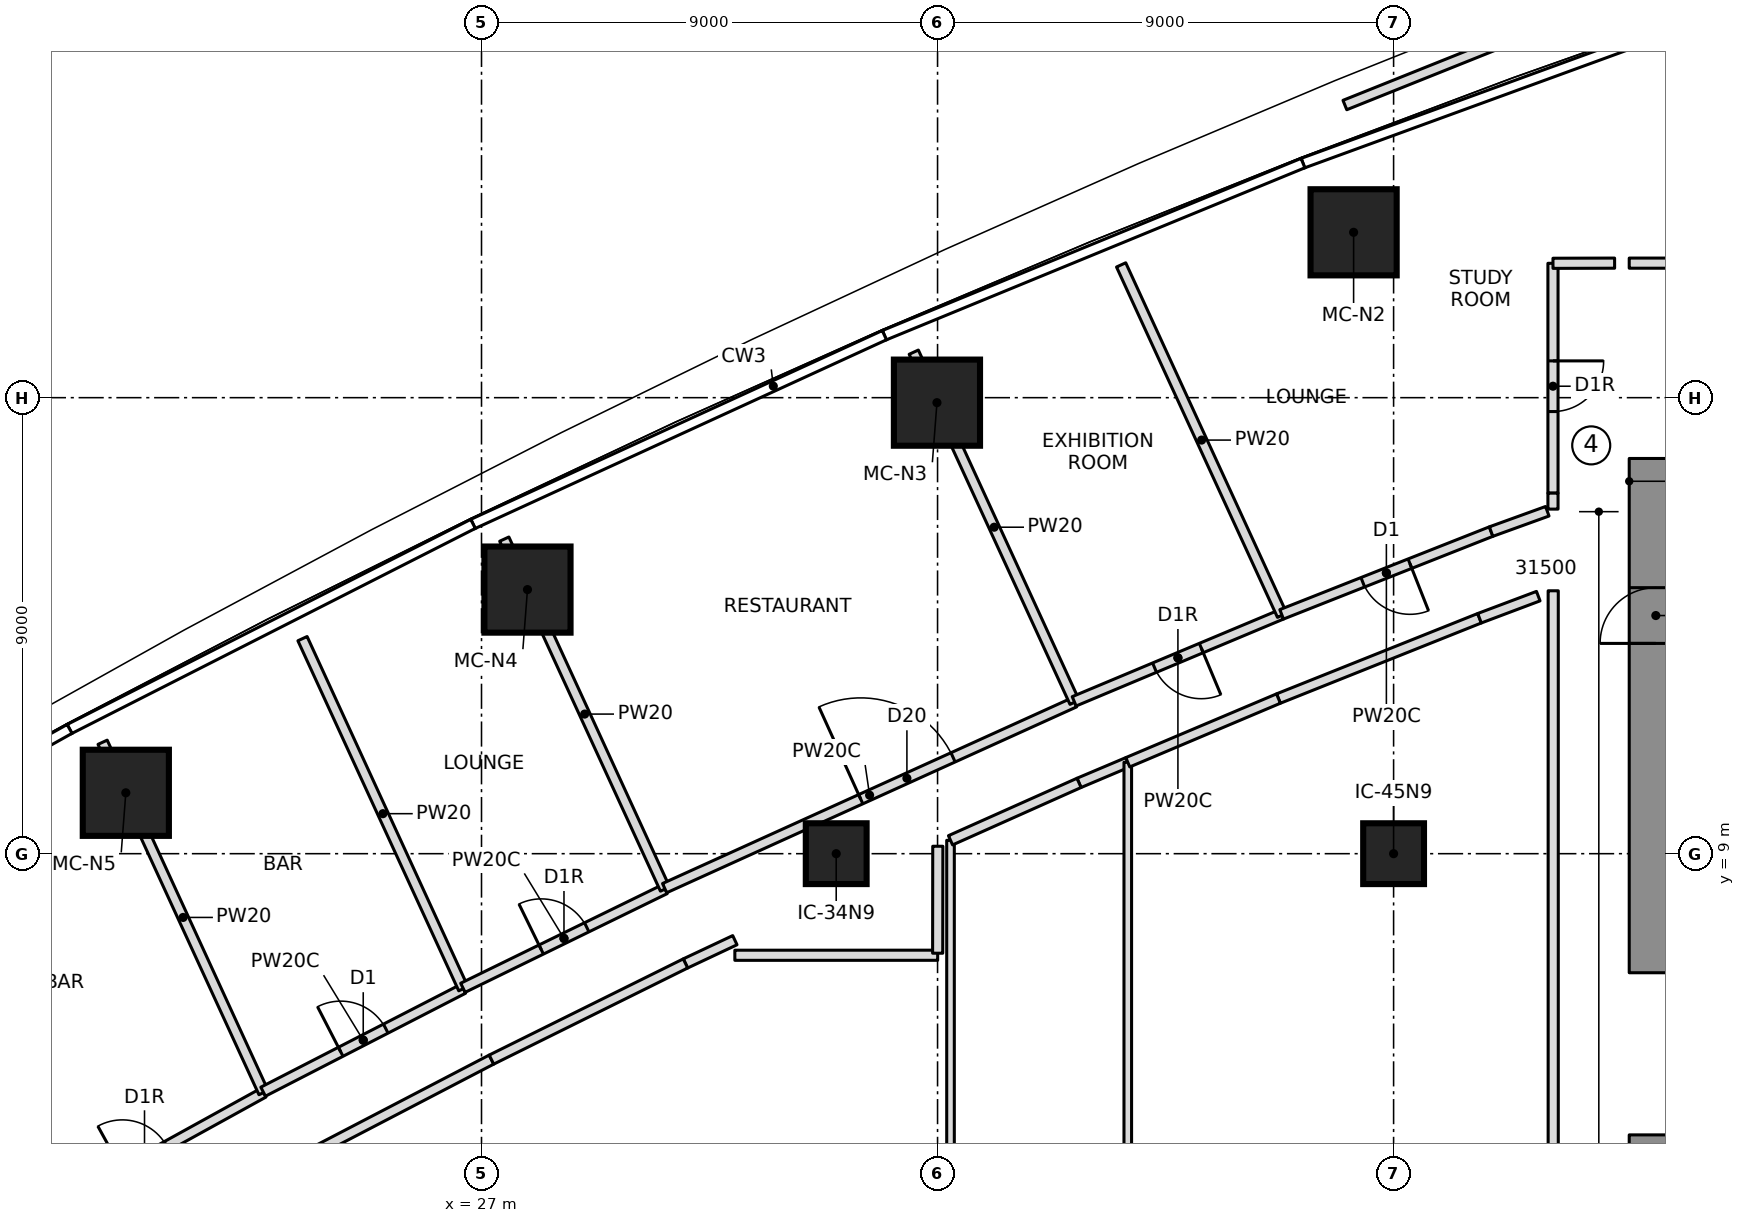
"""IFC4 building model, lengths in metres.
Left out: names, types, materials, properties, quantities, classifications, styles, units other than length and angle.
Written with IfcOpenShell. Run it as: python <this file> out.ifc"""

import sys

from ifc_helpers import new_model, si_unit, direction, frame, frame_2d, origin, origin_2d, place, context, subcontext, project, spatial, rectangle, extrude, element, fill, save


model = new_model("IFC4")
c1 = context("Model", 3, precision=1e-05, world=origin(), true_north=direction((0.0, 1.0)))
c2 = subcontext(c1, "Body", "Model", "MODEL_VIEW")
j1 = project(units=[si_unit("LENGTHUNIT", "METRE"), si_unit("PLANEANGLEUNIT", "RADIAN")], contexts=[c1])
p1 = place(None, origin())
s1 = spatial("IfcSite", under=j1, at=p1, CompositionType="ELEMENT")
p2 = place(p1, origin())
s2 = spatial("IfcBuilding", under=s1, at=p2, CompositionType="ELEMENT")
p3 = place(p2, frame((0.0, 0.0, 80.3)))
s3 = spatial("IfcBuildingStorey", under=s2, at=p3, CompositionType="ELEMENT", Elevation=80.3)
p4 = place(p3, frame((50.175, 6.65, 0.0), z_axis=(0.0, 0.0, 1.0), x_axis=(0.0, 1.0, 0.0)))
e1 = element("IfcWall", 1, at=p4, inside=s3, PredefinedType="SHEAR", context=c2, shape_type="SweptSolid", body=[
    extrude(rectangle(XDim=10.15, YDim=1.05, at=frame_2d((5.075, 0.0))), origin(), (0.0, 0.0, 1.0), 4.6),
])
p5 = place(p4, frame((6.5, 0.0, 0.0)))
e2 = element("IfcOpeningElement", 2, at=p5, cuts=e1, PredefinedType="OPENING", context=c2, shape_type="SweptSolid", body=[
    extrude(rectangle(XDim=1.1, YDim=2.1, at=frame_2d((0.55, 1.05))), frame((0.0, 0.535, 0.0), z_axis=(0.0, -1.0, 0.0), x_axis=(1.0, 0.0, 0.0)), (0.0, 0.0, 1.0), 1.07),
])
p6 = place(p3, frame((50.175, -3.45, 0.0), z_axis=(0.0, 0.0, 1.0), x_axis=(0.0, 1.0, 0.0)))
e3 = element("IfcWall", 3, at=p6, inside=s3, PredefinedType="SHEAR", context=c2, shape_type="SweptSolid", body=[
    extrude(rectangle(XDim=6.9, YDim=1.05, at=frame_2d((3.45, 0.0))), origin(), (0.0, 0.0, 1.0), 4.6),
])
for number, where, z_axis, x_axis in (
    (4, (44.211, 21.264, 0.0), (0.0, 0.0, 1.0), (1.0, 0.0, 0.0)),
    (5, (35.988, 17.902, 0.0), (0.0, 0.0, 1.0), (1.0, 0.0, 0.0)),
    (6, (27.907, 14.212, 0.0), (0.0, 0.0, 1.0), (1.0, 0.0, 0.0)),
    (7, (19.981, 10.202, 0.0), (0.0, 0.0, 1.0), (1.0, 0.0, 0.0)),
):
    element("IfcColumn", number, at=place(p3, frame(where, z_axis=z_axis, x_axis=x_axis)), inside=s3, PredefinedType="COLUMN", context=c2, shape_type="SweptSolid", body=[
        extrude(rectangle(XDim=1.7, YDim=1.7, at=origin_2d()), origin(), (0.0, 0.0, 1.0), 4.6),
    ])
for number, where, z_axis, x_axis in (
    (8, (34.0, 9.0, 0.0), (0.0, 0.0, 1.0), (1.0, 0.0, 0.0)),
    (9, (45.0, 9.0, 0.0), (0.0, 0.0, 1.0), (1.0, 0.0, 0.0)),
):
    element("IfcColumn", number, at=place(p3, frame(where, z_axis=z_axis, x_axis=x_axis)), inside=s3, PredefinedType="COLUMN", context=c2, shape_type="SweptSolid", body=[
        extrude(rectangle(XDim=1.2, YDim=1.2, at=origin_2d()), origin(), (0.0, 0.0, 1.0), 4.6),
    ])
p7 = place(p3, frame((47.924, 25.332, 0.0), z_axis=(0.0, 0.0, 1.0), x_axis=(-0.928295561605, -0.371843179719, 0.0)))
e10 = element("IfcWall", 10, at=p7, inside=s3, PredefinedType="PARAPET", context=c2, shape_type="SweptSolid", body=[
    extrude(rectangle(XDim=4.186, YDim=0.2, at=frame_2d((2.093, 0.0))), origin(), (0.0, 0.0, 1.0), 1.1),
])
p8 = place(p3, frame((18.0, 1.692, 0.0), z_axis=(0.0, 0.0, 1.0), x_axis=(0.875548487611, 0.483130257634, 0.0)))
e11 = element("IfcWall", 11, at=p8, inside=s3, PredefinedType="PARTITIONING", context=c2, shape_type="SweptSolid", body=[
    extrude(rectangle(XDim=5.367, YDim=0.2, at=frame_2d((2.683, 0.0))), origin(), (0.0, 0.0, 1.0), 4.3),
])
p9 = place(p8, frame((2.183, 0.0, 0.0)))
e12 = element("IfcOpeningElement", 12, at=p9, cuts=e11, PredefinedType="OPENING", context=c2, shape_type="SweptSolid", body=[
    extrude(rectangle(XDim=1.0, YDim=2.1, at=frame_2d((0.5, 1.05))), frame((0.0, 0.11, 0.0), z_axis=(0.0, -1.0, 0.0), x_axis=(1.0, 0.0, 0.0)), (0.0, 0.0, 1.0), 0.22),
])
p10 = place(p3, frame((22.699, 4.284, 0.0), z_axis=(0.0, 0.0, 1.0), x_axis=(-0.417413534969, 0.908716644959, 0.0)))
e13 = element("IfcWall", 13, at=p10, inside=s3, PredefinedType="PARTITIONING", context=c2, shape_type="SweptSolid", body=[
    extrude(rectangle(XDim=7.609, YDim=0.2, at=frame_2d((3.805, 0.0))), origin(), (0.0, 0.0, 1.0), 4.3),
])
p11 = place(p3, frame((22.69, 4.302, 0.0), z_axis=(0.0, 0.0, 1.0), x_axis=(0.889236075961, 0.457448577667, 0.0)))
e14 = element("IfcWall", 14, at=p11, inside=s3, PredefinedType="PARTITIONING", context=c2, shape_type="SweptSolid", body=[
    extrude(rectangle(XDim=4.443, YDim=0.2, at=frame_2d((2.222, 0.0))), origin(), (0.0, 0.0, 1.0), 4.3),
])
p12 = place(p11, frame((1.721, 0.0, 0.0)))
e15 = element("IfcOpeningElement", 15, at=p12, cuts=e14, PredefinedType="OPENING", context=c2, shape_type="SweptSolid", body=[
    extrude(rectangle(XDim=1.0, YDim=2.1, at=frame_2d((0.5, 1.05))), frame((0.0, 0.11, 0.0), z_axis=(0.0, -1.0, 0.0), x_axis=(1.0, 0.0, 0.0)), (0.0, 0.0, 1.0), 0.22),
])
p13 = place(p3, frame((26.641, 6.335, 0.0), z_axis=(0.0, 0.0, 1.0), x_axis=(-0.417455028008, 0.908697584233, 0.0)))
e16 = element("IfcWall", 16, at=p13, inside=s3, PredefinedType="PARTITIONING", context=c2, shape_type="SweptSolid", body=[
    extrude(rectangle(XDim=7.603, YDim=0.2, at=frame_2d((3.802, 0.0))), origin(), (0.0, 0.0, 1.0), 4.3),
])
p14 = place(p3, frame((26.633, 6.353, 0.0), z_axis=(0.0, 0.0, 1.0), x_axis=(0.898502457097, 0.438968489291, 0.0)))
e17 = element("IfcWall", 17, at=p14, inside=s3, PredefinedType="PARTITIONING", context=c2, shape_type="SweptSolid", body=[
    extrude(rectangle(XDim=4.44, YDim=0.2, at=frame_2d((2.22, 0.0))), origin(), (0.0, 0.0, 1.0), 4.3),
])
p15 = place(p14, frame((1.72, 0.0, 0.0)))
e18 = element("IfcOpeningElement", 18, at=p15, cuts=e17, PredefinedType="OPENING", context=c2, shape_type="SweptSolid", body=[
    extrude(rectangle(XDim=1.0, YDim=2.1, at=frame_2d((0.5, 1.05))), frame((0.0, 0.11, 0.0), z_axis=(0.0, -1.0, 0.0), x_axis=(1.0, 0.0, 0.0)), (0.0, 0.0, 1.0), 0.22),
])
p16 = place(p3, frame((30.622, 8.302, 0.0), z_axis=(0.0, 0.0, 1.0), x_axis=(-0.417429919618, 0.90870911859, 0.0)))
e19 = element("IfcWall", 19, at=p16, inside=s3, PredefinedType="PARTITIONING", context=c2, shape_type="SweptSolid", body=[
    extrude(rectangle(XDim=7.6, YDim=0.2, at=frame_2d((3.8, 0.0))), origin(), (0.0, 0.0, 1.0), 4.3),
])
p17 = place(p3, frame((30.614, 8.32, 0.0), z_axis=(0.0, 0.0, 1.0), x_axis=(0.910751030363, 0.41295588226, 0.0)))
e20 = element("IfcWall", 20, at=p17, inside=s3, PredefinedType="PARTITIONING", context=c2, shape_type="SweptSolid", body=[
    extrude(rectangle(XDim=8.883, YDim=0.2, at=frame_2d((4.442, 0.0))), origin(), (0.0, 0.0, 1.0), 4.3),
])
p18 = place(p17, frame((4.25, 0.0, 0.0)))
e21 = element("IfcOpeningElement", 21, at=p18, cuts=e20, PredefinedType="OPENING", context=c2, shape_type="SweptSolid", body=[
    extrude(rectangle(XDim=2.0, YDim=2.4, at=frame_2d((1.0, 1.2))), frame((0.0, 0.11, 0.0), z_axis=(0.0, -1.0, 0.0), x_axis=(1.0, 0.0, 0.0)), (0.0, 0.0, 1.0), 0.22),
])
p19 = place(p3, frame((38.704, 11.989, 0.0), z_axis=(0.0, 0.0, 1.0), x_axis=(-0.417416334044, 0.908715359215, 0.0)))
e22 = element("IfcWall", 22, at=p19, inside=s3, PredefinedType="PARTITIONING", context=c2, shape_type="SweptSolid", body=[
    extrude(rectangle(XDim=7.604, YDim=0.2, at=frame_2d((3.802, 0.0))), origin(), (0.0, 0.0, 1.0), 4.3),
])
p20 = place(p3, frame((42.791, 13.724, 0.0), z_axis=(0.0, 0.0, 1.0), x_axis=(-0.922230433067, -0.386640696675, 0.0)))
e23 = element("IfcWall", 23, at=p20, inside=s3, PredefinedType="PARTITIONING", context=c2, shape_type="SweptSolid", body=[
    extrude(rectangle(XDim=4.44, YDim=0.2, at=frame_2d((2.22, 0.0))), origin(), (0.0, 0.0, 1.0), 4.3),
])
p21 = place(p20, frame((1.72, 0.0, 0.0)))
e24 = element("IfcOpeningElement", 24, at=p21, cuts=e23, PredefinedType="OPENING", context=c2, shape_type="SweptSolid", body=[
    extrude(rectangle(XDim=1.0, YDim=2.1, at=frame_2d((0.5, 1.05))), frame((0.0, 0.11, 0.0), z_axis=(0.0, -1.0, 0.0), x_axis=(1.0, 0.0, 0.0)), (0.0, 0.0, 1.0), 0.22),
])
p22 = place(p3, frame((42.799, 13.705, 0.0), z_axis=(0.0, 0.0, 1.0), x_axis=(-0.417427858403, 0.908710065438, 0.0)))
e25 = element("IfcWall", 25, at=p22, inside=s3, PredefinedType="PARTITIONING", context=c2, shape_type="SweptSolid", body=[
    extrude(rectangle(XDim=7.61, YDim=0.2, at=frame_2d((3.805, 0.0))), origin(), (0.0, 0.0, 1.0), 4.3),
])
p23 = place(p3, frame((46.924, 15.357, 0.0), z_axis=(0.0, 0.0, 1.0), x_axis=(-0.930040633249, -0.367456692014, 0.0)))
e26 = element("IfcWall", 26, at=p23, inside=s3, PredefinedType="PARTITIONING", context=c2, shape_type="SweptSolid", body=[
    extrude(rectangle(XDim=4.444, YDim=0.2, at=frame_2d((2.222, 0.0))), origin(), (0.0, 0.0, 1.0), 4.3),
])
p24 = place(p23, frame((1.722, 0.0, 0.0)))
e27 = element("IfcOpeningElement", 27, at=p24, cuts=e26, PredefinedType="OPENING", context=c2, shape_type="SweptSolid", body=[
    extrude(rectangle(XDim=1.0, YDim=2.1, at=frame_2d((0.5, 1.05))), frame((0.0, 0.11, 0.0), z_axis=(0.0, -1.0, 0.0), x_axis=(1.0, 0.0, 0.0)), (0.0, 0.0, 1.0), 0.22),
])
p25 = place(p3, frame((31.025, 6.833, 0.0), z_axis=(0.0, 0.0, 1.0), x_axis=(0.904690325494, 0.426069730159, 0.0)))
e28 = element("IfcWall", 28, at=p25, inside=s3, PredefinedType="PARTITIONING", context=c2, shape_type="SweptSolid", body=[
    extrude(rectangle(XDim=1.078, YDim=0.2, at=frame_2d((0.539, 0.0))), origin(), (0.0, 0.0, 1.0), 4.3),
])
p26 = place(p3, frame((23.662, 3.095, 0.0), z_axis=(0.0, 0.0, 1.0), x_axis=(0.886903625221, 0.461954499459, 0.0)))
e29 = element("IfcWall", 29, at=p26, inside=s3, PredefinedType="PARTITIONING", context=c2, shape_type="SweptSolid", body=[
    extrude(rectangle(XDim=3.985, YDim=0.2, at=frame_2d((1.992, 0.0))), origin(), (0.0, 0.0, 1.0), 4.3),
])
p27 = place(p3, frame((27.196, 4.936, 0.0), z_axis=(0.0, 0.0, 1.0), x_axis=(0.895975836328, 0.44410280422, 0.0)))
e30 = element("IfcWall", 30, at=p27, inside=s3, PredefinedType="PARTITIONING", context=c2, shape_type="SweptSolid", body=[
    extrude(rectangle(XDim=4.273, YDim=0.2, at=frame_2d((2.137, 0.0))), origin(), (0.0, 0.0, 1.0), 4.3),
])
p28 = place(p3, frame((36.256, -9.264, 0.0), z_axis=(0.0, 0.0, 1.0), x_axis=(0.0, 1.0, 0.0)))
e31 = element("IfcWall", 31, at=p28, inside=s3, PredefinedType="PARTITIONING", context=c2, shape_type="SweptSolid", body=[
    extrude(rectangle(XDim=18.528, YDim=0.15, at=frame_2d((9.264, 0.0))), origin(), (0.0, 0.0, 1.0), 4.3),
])
p29 = place(p3, frame((38.792, 10.397, 0.0), z_axis=(0.0, 0.0, 1.0), x_axis=(0.921080112261, 0.389373120281, 0.0)))
e32 = element("IfcWall", 32, at=p29, inside=s3, PredefinedType="PARTITIONING", context=c2, shape_type="SweptSolid", body=[
    extrude(rectangle(XDim=1.045, YDim=0.2, at=frame_2d((0.522, 0.0))), origin(), (0.0, 0.0, 1.0), 4.3),
])
p30 = place(p3, frame((36.256, 9.264, 0.0), z_axis=(0.0, 0.0, 1.0), x_axis=(0.913023336604, 0.407907326259, 0.0)))
e33 = element("IfcWall", 33, at=p30, inside=s3, PredefinedType="PARTITIONING", context=c2, shape_type="SweptSolid", body=[
    extrude(rectangle(XDim=2.778, YDim=0.2, at=frame_2d((1.389, 0.0))), origin(), (0.0, 0.0, 1.0), 4.3),
])
p31 = place(p3, frame((39.754, -10.804, 0.0), z_axis=(0.0, 0.0, 1.0), x_axis=(0.0, 1.0, 0.0)))
e34 = element("IfcWall", 34, at=p31, inside=s3, PredefinedType="PARTITIONING", context=c2, shape_type="SweptSolid", body=[
    extrude(rectangle(XDim=21.608, YDim=0.15, at=frame_2d((10.804, 0.0))), origin(), (0.0, 0.0, 1.0), 4.3),
])
p32 = place(p3, frame((42.728, 12.062, 0.0), z_axis=(0.0, 0.0, 1.0), x_axis=(0.928638161177, 0.370986745864, 0.0)))
e35 = element("IfcWall", 35, at=p32, inside=s3, PredefinedType="PARTITIONING", context=c2, shape_type="SweptSolid", body=[
    extrude(rectangle(XDim=4.273, YDim=0.2, at=frame_2d((2.136, 0.0))), origin(), (0.0, 0.0, 1.0), 4.3),
])
p33 = place(p3, frame((39.754, 10.804, 0.0), z_axis=(0.0, 0.0, 1.0), x_axis=(0.921023598919, 0.389506778163, 0.0)))
e36 = element("IfcWall", 36, at=p33, inside=s3, PredefinedType="PARTITIONING", context=c2, shape_type="SweptSolid", body=[
    extrude(rectangle(XDim=3.229, YDim=0.2, at=frame_2d((1.614, 0.0))), origin(), (0.0, 0.0, 1.0), 4.3),
])
p34 = place(p3, frame((54.625, 20.655, 0.0), z_axis=(0.0, 0.0, 1.0), x_axis=(-1.0, 0.0, 0.0)))
e37 = element("IfcWall", 37, at=p34, inside=s3, PredefinedType="PARTITIONING", context=c2, shape_type="SweptSolid", body=[
    extrude(rectangle(XDim=4.976, YDim=0.2, at=frame_2d((2.488, 0.0))), origin(), (0.0, 0.0, 1.0), 4.3),
])
p35 = place(p34, frame((1.988, 0.0, 0.0)))
e38 = element("IfcOpeningElement", 38, at=p35, cuts=e37, PredefinedType="OPENING", context=c2, shape_type="SweptSolid", body=[
    extrude(rectangle(XDim=1.5, YDim=2.1, at=frame_2d((0.75, 1.05))), frame((0.0, 0.11, 0.0), z_axis=(0.0, -1.0, 0.0), x_axis=(1.0, 0.0, 0.0)), (0.0, 0.0, 1.0), 0.22),
])
p36 = place(p3, frame((46.696, 13.647, 0.0), z_axis=(0.0, 0.0, 1.0), x_axis=(0.935907269358, 0.352246480696, 0.0)))
e39 = element("IfcWall", 39, at=p36, inside=s3, PredefinedType="PARTITIONING", context=c2, shape_type="SweptSolid", body=[
    extrude(rectangle(XDim=1.239, YDim=0.2, at=frame_2d((0.619, 0.0))), origin(), (0.0, 0.0, 1.0), 4.3),
])
p37 = place(p3, frame((48.146, 20.652, 0.0), z_axis=(0.0, 0.0, 1.0), x_axis=(-5.3821313e-05, -0.999999998552, 0.0)))
e40 = element("IfcWall", 40, at=p37, inside=s3, PredefinedType="PARTITIONING", context=c2, shape_type="SweptSolid", body=[
    extrude(rectangle(XDim=4.536, YDim=0.2, at=frame_2d((2.268, 0.0))), origin(), (0.0, 0.0, 1.0), 4.3),
])
p38 = place(p37, frame((1.926, 0.0, 0.0)))
e41 = element("IfcOpeningElement", 41, at=p38, cuts=e40, PredefinedType="OPENING", context=c2, shape_type="SweptSolid", body=[
    extrude(rectangle(XDim=1.0, YDim=2.1, at=frame_2d((0.5, 1.05))), frame((0.0, 0.11, 0.0), z_axis=(0.0, -1.0, 0.0), x_axis=(1.0, 0.0, 0.0)), (0.0, 0.0, 1.0), 0.22),
])
p39 = place(p3, frame((32.0, 6.995, 0.0), z_axis=(0.0, 0.0, 1.0), x_axis=(0.99999999256, 0.00012198097, 0.0)))
e42 = element("IfcWall", 42, at=p39, inside=s3, PredefinedType="PARTITIONING", context=c2, shape_type="SweptSolid", body=[
    extrude(rectangle(XDim=4.003, YDim=0.2, at=frame_2d((2.001, 0.0))), origin(), (0.0, 0.0, 1.0), 4.3),
])
p40 = place(p3, frame((36.002, 7.036, 0.0), z_axis=(0.0, 0.0, 1.0), x_axis=(0.001156603436, 0.999999331134, 0.0)))
e43 = element("IfcWall", 43, at=p40, inside=s3, PredefinedType="PARTITIONING", context=c2, shape_type="SweptSolid", body=[
    extrude(rectangle(XDim=2.111, YDim=0.2, at=frame_2d((1.055, 0.0))), origin(), (0.0, 0.0, 1.0), 4.3),
])
p41 = place(p3, frame((48.15, 14.189, 0.0), z_axis=(0.0, 0.0, 1.0), x_axis=(0.0, -1.0, 0.0)))
e44 = element("IfcWall", 44, at=p41, inside=s3, PredefinedType="PARTITIONING", context=c2, shape_type="SweptSolid", body=[
    extrude(rectangle(XDim=28.377, YDim=0.2, at=frame_2d((14.189, 0.0))), origin(), (0.0, 0.0, 1.0), 4.3),
])
p42 = place(p3, frame((49.362, 20.655, 0.0), z_axis=(0.0, 0.0, 1.0), x_axis=(-0.999996595549, -0.002609384934, 0.0)))
e45 = element("IfcWall", 45, at=p42, inside=s3, PredefinedType="PARTITIONING", context=c2, shape_type="SweptSolid", body=[
    extrude(rectangle(XDim=1.216, YDim=0.2, at=frame_2d((0.608, 0.0))), origin(), (0.0, 0.0, 1.0), 4.3),
])
p43 = place(p3, frame((48.145, 16.116, 0.0), z_axis=(0.0, 0.0, 1.0), x_axis=(0.0, -1.0, 0.0)))
e46 = element("IfcWall", 46, at=p43, inside=s3, PredefinedType="PARTITIONING", context=c2, shape_type="SweptSolid", body=[
    extrude(rectangle(XDim=0.315, YDim=0.2, at=frame_2d((0.158, 0.0))), origin(), (0.0, 0.0, 1.0), 4.3),
])
p44 = place(p3, frame((48.033, 15.758, 0.0), z_axis=(0.0, 0.0, 1.0), x_axis=(-0.940233856013, -0.340529434862, 0.0)))
e47 = element("IfcWall", 47, at=p44, inside=s3, PredefinedType="PARTITIONING", context=c2, shape_type="SweptSolid", body=[
    extrude(rectangle(XDim=1.179, YDim=0.2, at=frame_2d((0.59, 0.0))), origin(), (0.0, 0.0, 1.0), 4.3),
])
p45 = place(p12, origin())
e48 = element("IfcDoor", 48, at=p45, inside=s3, OperationType="SINGLE_SWING_LEFT", PredefinedType="DOOR", context=c2, shape_type="SweptSolid", body=[
    extrude(rectangle(XDim=1.0, YDim=2.1, at=frame_2d((0.5, 1.05))), frame((0.0, 0.025, 0.0), z_axis=(0.0, -1.0, 0.0), x_axis=(1.0, 0.0, 0.0)), (0.0, 0.0, 1.0), 0.05),
])
fill(e15, e48)
p46 = place(p15, origin())
e49 = element("IfcDoor", 49, at=p46, inside=s3, OperationType="SINGLE_SWING_RIGHT", PredefinedType="DOOR", context=c2, shape_type="SweptSolid", body=[
    extrude(rectangle(XDim=1.0, YDim=2.1, at=frame_2d((0.5, 1.05))), frame((0.0, 0.025, 0.0), z_axis=(0.0, -1.0, 0.0), x_axis=(1.0, 0.0, 0.0)), (0.0, 0.0, 1.0), 0.05),
])
fill(e18, e49)
p47 = place(p18, origin())
e50 = element("IfcDoor", 50, at=p47, inside=s3, OperationType="DOUBLE_DOOR_SINGLE_SWING", PredefinedType="DOOR", context=c2, shape_type="SweptSolid", body=[
    extrude(rectangle(XDim=2.0, YDim=2.4, at=frame_2d((1.0, 1.2))), frame((0.0, 0.025, 0.0), z_axis=(0.0, -1.0, 0.0), x_axis=(1.0, 0.0, 0.0)), (0.0, 0.0, 1.0), 0.05),
])
fill(e21, e50)
p48 = place(p21, origin())
e51 = element("IfcDoor", 51, at=p48, inside=s3, OperationType="SINGLE_SWING_RIGHT", PredefinedType="DOOR", context=c2, shape_type="SweptSolid", body=[
    extrude(rectangle(XDim=1.0, YDim=2.1, at=frame_2d((0.5, 1.05))), frame((0.0, 0.025, 0.0), z_axis=(0.0, -1.0, 0.0), x_axis=(1.0, 0.0, 0.0)), (0.0, 0.0, 1.0), 0.05),
])
fill(e24, e51)
p49 = place(p24, origin())
e52 = element("IfcDoor", 52, at=p49, inside=s3, OperationType="SINGLE_SWING_LEFT", PredefinedType="DOOR", context=c2, shape_type="SweptSolid", body=[
    extrude(rectangle(XDim=1.0, YDim=2.1, at=frame_2d((0.5, 1.05))), frame((0.0, 0.025, 0.0), z_axis=(0.0, -1.0, 0.0), x_axis=(1.0, 0.0, 0.0)), (0.0, 0.0, 1.0), 0.05),
])
fill(e27, e52)
p50 = place(p38, origin())
e53 = element("IfcDoor", 53, at=p50, inside=s3, OperationType="SINGLE_SWING_RIGHT", PredefinedType="DOOR", context=c2, shape_type="SweptSolid", body=[
    extrude(rectangle(XDim=1.0, YDim=2.1, at=frame_2d((0.5, 1.05))), frame((0.0, 0.025, 0.0), z_axis=(0.0, -1.0, 0.0), x_axis=(1.0, 0.0, 0.0)), (0.0, 0.0, 1.0), 0.05),
])
fill(e41, e53)
p51 = place(p5, origin())
e54 = element("IfcDoor", 54, at=p51, inside=s3, OperationType="SINGLE_SWING_RIGHT", PredefinedType="DOOR", context=c2, shape_type="SweptSolid", body=[
    extrude(rectangle(XDim=1.1, YDim=2.1, at=frame_2d((0.55, 1.05))), frame((0.0, 0.025, 0.0), z_axis=(0.0, -1.0, 0.0), x_axis=(1.0, 0.0, 0.0)), (0.0, 0.0, 1.0), 0.05),
])
fill(e2, e54)
save(model, sys.argv[1])
